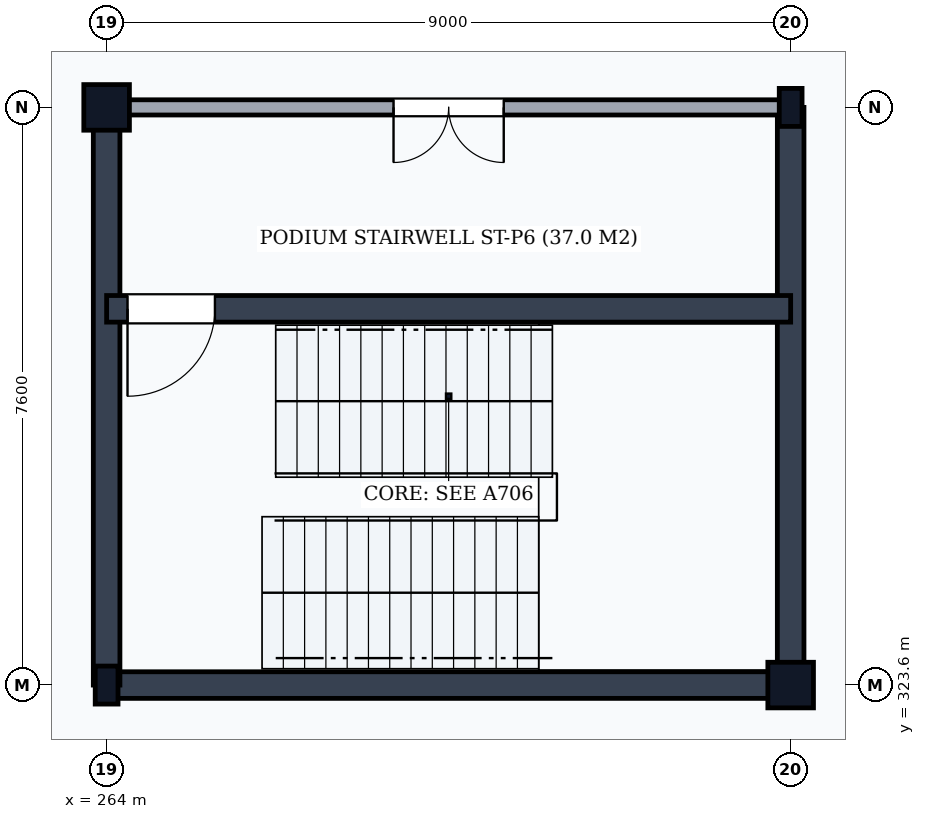
"""IFC4 building model, lengths in metres.
Left out: names, types, materials, properties, quantities, classifications, styles, units other than length and angle.
Written with IfcOpenShell. Run it as: python <this file> out.ifc"""

import sys

from ifc_helpers import new_model, si_unit, direction, frame, frame_2d, origin, origin_2d, place, context, subcontext, project, spatial, rectangle, i_section, extrude, element, fill, save


model = new_model("IFC4")
c1 = context("Model", 3, precision=1e-05, world=origin(), true_north=direction((0.0, 1.0)))
c2 = subcontext(c1, "Body", "Model", "MODEL_VIEW")
j1 = project(units=[si_unit("LENGTHUNIT", "METRE"), si_unit("PLANEANGLEUNIT", "RADIAN")], contexts=[c1])
p1 = place(None, origin())
s1 = spatial("IfcSite", under=j1, at=p1, CompositionType="ELEMENT")
p2 = place(p1, origin())
s2 = spatial("IfcBuilding", under=s1, at=p2, CompositionType="ELEMENT")
p3 = place(p2, frame((0.0, 0.0, -4.8)))
s3 = spatial("IfcBuildingStorey", under=s2, at=p3, CompositionType="ELEMENT", Elevation=-4.8)
p4 = place(p3, frame((264.0, 323.6, 0.0), z_axis=(0.0, 0.0, 1.0), x_axis=(1.0, 0.0, 0.0)))
e1 = element("IfcColumn", 1, at=p4, inside=s3, PredefinedType="COLUMN", context=c2, shape_type="SweptSolid", body=[
    extrude(i_section(OverallWidth=0.3, OverallDepth=0.5, WebThickness=0.014, FlangeThickness=0.028, FilletRadius=0.027, at=origin_2d()), origin(), (0.0, 0.0, 1.0), 4.8),
])
for number, where, z_axis, x_axis in (
    (2, (264.0, 331.2, 0.0), (0.0, 0.0, 1.0), (1.0, 0.0, 0.0)),
    (3, (273.0, 323.6, 0.0), (0.0, 0.0, 1.0), (1.0, 0.0, 0.0)),
):
    element("IfcColumn", number, at=place(p3, frame(where, z_axis=z_axis, x_axis=x_axis)), inside=s3, PredefinedType="COLUMN", context=c2, shape_type="SweptSolid", body=[
        extrude(rectangle(XDim=0.6, YDim=0.6, at=origin_2d()), origin(), (0.0, 0.0, 1.0), 4.8),
    ])
p5 = place(p3, frame((273.0, 331.2, 0.0), z_axis=(0.0, 0.0, 1.0), x_axis=(1.0, 0.0, 0.0)))
e4 = element("IfcColumn", 4, at=p5, inside=s3, PredefinedType="COLUMN", context=c2, shape_type="SweptSolid", body=[
    extrude(i_section(OverallWidth=0.3, OverallDepth=0.5, WebThickness=0.014, FlangeThickness=0.028, FilletRadius=0.027, at=origin_2d()), origin(), (0.0, 0.0, 1.0), 4.8),
])
p6 = place(p3, frame((264.0, 323.6, 0.0), z_axis=(0.0, 0.0, 1.0), x_axis=(1.0, 0.0, 0.0)))
e5 = element("IfcWall", 5, at=p6, inside=s3, PredefinedType="SHEAR", context=c2, shape_type="SweptSolid", body=[
    extrude(rectangle(XDim=9.0, YDim=0.35, at=frame_2d((4.5, 0.0))), origin(), (0.0, 0.0, 1.0), 4.51),
])
for number, where, z_axis, x_axis in (
    (6, (264.0, 323.6, 0.0), (0.0, 0.0, 1.0), (0.0, 1.0, 0.0)),
    (7, (273.0, 323.6, 0.0), (0.0, 0.0, 1.0), (0.0, 1.0, 0.0)),
):
    element("IfcWall", number, at=place(p3, frame(where, z_axis=z_axis, x_axis=x_axis)), inside=s3, PredefinedType="SHEAR", context=c2, shape_type="SweptSolid", body=[
        extrude(rectangle(XDim=7.6, YDim=0.35, at=frame_2d((3.8, 0.0))), origin(), (0.0, 0.0, 1.0), 4.51),
    ])
p7 = place(p3, frame((264.0, 328.55, 0.0), z_axis=(0.0, 0.0, 1.0), x_axis=(1.0, 0.0, 0.0)))
e8 = element("IfcWall", 8, at=p7, inside=s3, PredefinedType="SHEAR", context=c2, shape_type="SweptSolid", body=[
    extrude(rectangle(XDim=9.0, YDim=0.35, at=frame_2d((4.5, 0.0))), origin(), (0.0, 0.0, 1.0), 4.51),
])
p8 = place(p7, frame((0.275, 0.0, 0.0)))
e9 = element("IfcOpeningElement", 9, at=p8, cuts=e8, PredefinedType="OPENING", context=c2, shape_type="SweptSolid", body=[
    extrude(rectangle(XDim=1.15, YDim=2.15, at=frame_2d((0.575, 1.075))), frame((0.0, 0.19, 0.0), z_axis=(0.0, -1.0, 0.0), x_axis=(1.0, 0.0, 0.0)), (0.0, 0.0, 1.0), 0.38),
])
p9 = place(p3, frame((264.0, 331.2, 0.0), z_axis=(0.0, 0.0, 1.0), x_axis=(1.0, 0.0, 0.0)))
e10 = element("IfcWall", 10, at=p9, inside=s3, PredefinedType="PARTITIONING", context=c2, shape_type="SweptSolid", body=[
    extrude(rectangle(XDim=9.0, YDim=0.2, at=frame_2d((4.5, 0.0))), origin(), (0.0, 0.0, 1.0), 3.808),
])
p10 = place(p9, frame((3.775, 0.0, 0.0)))
e11 = element("IfcOpeningElement", 11, at=p10, cuts=e10, PredefinedType="OPENING", context=c2, shape_type="SweptSolid", body=[
    extrude(rectangle(XDim=1.45, YDim=2.2, at=frame_2d((0.725, 1.1))), frame((0.0, 0.115, 0.0), z_axis=(0.0, -1.0, 0.0), x_axis=(1.0, 0.0, 0.0)), (0.0, 0.0, 1.0), 0.23),
])
p11 = place(p8, frame((1.15, 0.0, 0.0), z_axis=(0.0, 0.0, 1.0), x_axis=(-1.0, 0.0, 0.0)))
e12 = element("IfcDoor", 12, at=p11, inside=s3, OperationType="SINGLE_SWING_RIGHT", PredefinedType="DOOR", context=c2, shape_type="SweptSolid", body=[
    extrude(rectangle(XDim=1.15, YDim=2.15, at=frame_2d((0.575, 1.075))), frame((0.0, 0.025, 0.0), z_axis=(0.0, -1.0, 0.0), x_axis=(1.0, 0.0, 0.0)), (0.0, 0.0, 1.0), 0.05),
])
fill(e9, e12)
p12 = place(p10, frame((1.45, 0.0, 0.0), z_axis=(0.0, 0.0, 1.0), x_axis=(-1.0, 0.0, 0.0)))
e13 = element("IfcDoor", 13, at=p12, inside=s3, OperationType="DOUBLE_DOOR_SINGLE_SWING", PredefinedType="DOOR", context=c2, shape_type="SweptSolid", body=[
    extrude(rectangle(XDim=1.45, YDim=2.2, at=frame_2d((0.725, 1.1))), frame((0.0, 0.025, 0.0), z_axis=(0.0, -1.0, 0.0), x_axis=(1.0, 0.0, 0.0)), (0.0, 0.0, 1.0), 0.05),
])
fill(e11, e13)
save(model, sys.argv[1])
